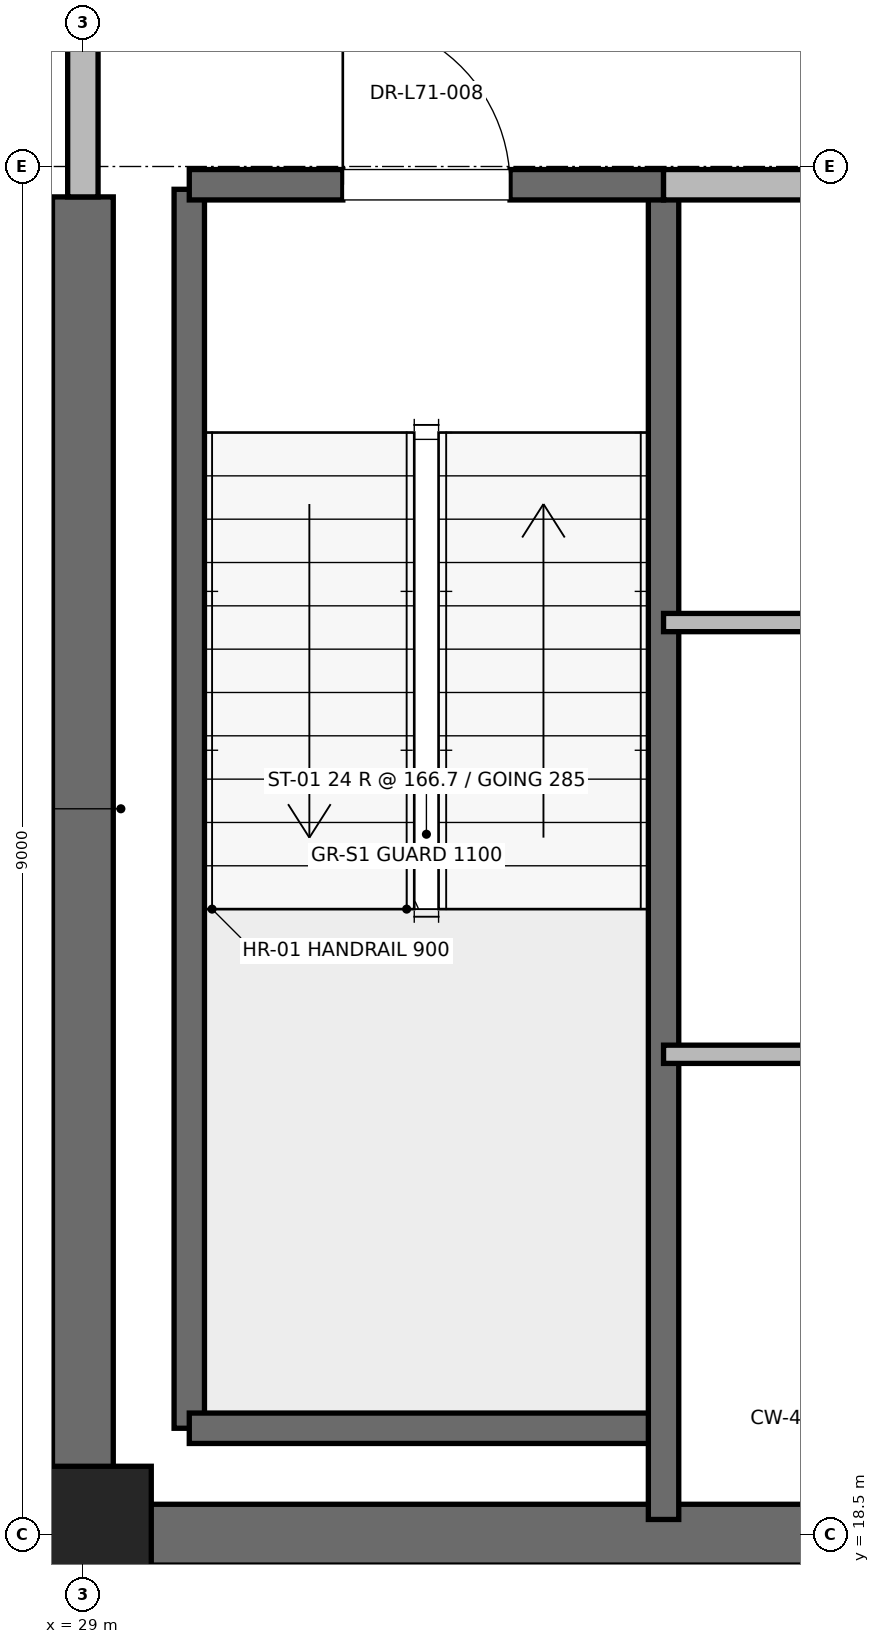
"""IFC4 building model, lengths in metres.
Left out: names, types, materials, properties, quantities, classifications, styles, units other than length and angle.
Written with IfcOpenShell. Run it as: python <this file> out.ifc"""

import sys

from ifc_helpers import new_model, si_unit, direction, frame, frame_2d, origin, origin_2d, place, context, subcontext, project, spatial, rectangle, extrude, element, fill, save


model = new_model("IFC4")
c1 = context("Model", 3, precision=1e-05, world=origin(), true_north=direction((0.0, 1.0)))
c2 = subcontext(c1, "Body", "Model", "MODEL_VIEW")
j1 = project(units=[si_unit("LENGTHUNIT", "METRE"), si_unit("PLANEANGLEUNIT", "RADIAN")], contexts=[c1])
p1 = place(None, origin())
s1 = spatial("IfcSite", under=j1, at=p1, CompositionType="ELEMENT")
p2 = place(p1, origin())
s2 = spatial("IfcBuilding", under=s1, at=p2, CompositionType="ELEMENT")
p3 = place(p2, frame((0.0, 0.0, 306.8)))
s3 = spatial("IfcBuildingStorey", under=s2, at=p3, CompositionType="ELEMENT", Elevation=306.8)
p4 = place(p3, frame((29.0, 18.5, 0.0), z_axis=(0.0, 0.0, 1.0), x_axis=(1.0, 0.0, 0.0)))
e1 = element("IfcColumn", 1, at=p4, inside=s3, PredefinedType="PILASTER", context=c2, shape_type="SweptSolid", body=[
    extrude(rectangle(XDim=0.9, YDim=0.9, at=origin_2d()), origin(), (0.0, 0.0, 1.0), 4.0),
])
p5 = place(p3, frame((29.0, 18.5, 0.0), z_axis=(0.0, 0.0, 1.0), x_axis=(1.0, 0.0, 0.0)))
e2 = element("IfcWall", 2, at=p5, inside=s3, PredefinedType="SHEAR", context=c2, shape_type="SweptSolid", body=[
    extrude(rectangle(XDim=9.2, YDim=0.4, at=frame_2d((4.6, 0.0))), origin(), (0.0, 0.0, 1.0), 3.785),
])
p6 = place(p3, frame((29.0, 18.5, 0.0), z_axis=(0.0, 0.0, 1.0), x_axis=(0.0, 1.0, 0.0)))
e3 = element("IfcWall", 3, at=p6, inside=s3, PredefinedType="SHEAR", context=c2, shape_type="SweptSolid", body=[
    extrude(rectangle(XDim=8.8, YDim=0.4, at=frame_2d((4.4, 0.0))), origin(), (0.0, 0.0, 1.0), 3.785),
])
p7 = place(p3, frame((29.7, 19.2, 0.0), z_axis=(0.0, 0.0, 1.0), x_axis=(0.0, 1.0, 0.0)))
e4 = element("IfcWall", 4, at=p7, inside=s3, PredefinedType="SOLIDWALL", context=c2, shape_type="SweptSolid", body=[
    extrude(rectangle(XDim=8.15, YDim=0.2, at=frame_2d((4.075, 0.0))), origin(), (0.0, 0.0, 1.0), 3.785),
])
p8 = place(p3, frame((29.7, 19.2, 0.0), z_axis=(0.0, 0.0, 1.0), x_axis=(1.0, 0.0, 0.0)))
e5 = element("IfcWall", 5, at=p8, inside=s3, PredefinedType="SOLIDWALL", context=c2, shape_type="SweptSolid", body=[
    extrude(rectangle(XDim=3.12, YDim=0.2, at=frame_2d((1.56, 0.0))), origin(), (0.0, 0.0, 1.0), 3.785),
])
p9 = place(p3, frame((32.82, 18.6, 0.0), z_axis=(0.0, 0.0, 1.0), x_axis=(0.0, 1.0, 0.0)))
e6 = element("IfcWall", 6, at=p9, inside=s3, PredefinedType="SOLIDWALL", context=c2, shape_type="SweptSolid", body=[
    extrude(rectangle(XDim=8.78, YDim=0.2, at=frame_2d((4.39, 0.0))), origin(), (0.0, 0.0, 1.0), 3.785),
])
p10 = place(p3, frame((29.7, 27.38, 0.0), z_axis=(0.0, 0.0, 1.0), x_axis=(1.0, 0.0, 0.0)))
e7 = element("IfcWall", 7, at=p10, inside=s3, PredefinedType="SOLIDWALL", context=c2, shape_type="SweptSolid", body=[
    extrude(rectangle(XDim=3.12, YDim=0.2, at=frame_2d((1.56, 0.0))), origin(), (0.0, 0.0, 1.0), 3.785),
])
p11 = place(p10, frame((1.01, 0.0, 0.0)))
e8 = element("IfcOpeningElement", 8, at=p11, cuts=e7, PredefinedType="OPENING", context=c2, shape_type="SweptSolid", body=[
    extrude(rectangle(XDim=1.1, YDim=2.15, at=frame_2d((0.55, 1.075))), frame((0.0, 0.1, 0.0), z_axis=(0.0, -1.0, 0.0), x_axis=(1.0, 0.0, 0.0)), (0.0, 0.0, 1.0), 0.2),
])
p12 = place(p3, frame((29.0, 27.3, 0.0), z_axis=(0.0, 0.0, 1.0), x_axis=(0.0, 1.0, 0.0)))
e9 = element("IfcWall", 9, at=p12, inside=s3, PredefinedType="PARTITIONING", context=c2, shape_type="SweptSolid", body=[
    extrude(rectangle(XDim=3.4, YDim=0.2, at=frame_2d((1.7, 0.0))), origin(), (0.0, 0.0, 1.0), 2.865),
])
p13 = place(p12, frame((1.125, 0.0, 0.0)))
e10 = element("IfcOpeningElement", 10, at=p13, cuts=e9, PredefinedType="OPENING", context=c2, shape_type="SweptSolid", body=[
    extrude(rectangle(XDim=1.15, YDim=2.2, at=frame_2d((0.575, 1.1))), frame((0.0, 0.1, 0.0), z_axis=(0.0, -1.0, 0.0), x_axis=(1.0, 0.0, 0.0)), (0.0, 0.0, 1.0), 0.2),
])
p14 = place(p3, frame((32.82, 27.38, 0.0), z_axis=(0.0, 0.0, 1.0), x_axis=(1.0, 0.0, 0.0)))
e11 = element("IfcWall", 11, at=p14, inside=s3, PredefinedType="PARTITIONING", context=c2, shape_type="SweptSolid", body=[
    extrude(rectangle(XDim=5.62, YDim=0.2, at=frame_2d((2.81, 0.0))), origin(), (0.0, 0.0, 1.0), 3.785),
])
for number, where, z_axis, x_axis in (
    (12, (32.82, 21.66, 0.0), (0.0, 0.0, 1.0), (1.0, 0.0, 0.0)),
    (13, (32.82, 24.5, 0.0), (0.0, 0.0, 1.0), (1.0, 0.0, 0.0)),
):
    element("IfcWall", number, at=place(p3, frame(where, z_axis=z_axis, x_axis=x_axis)), inside=s3, PredefinedType="PARTITIONING", context=c2, shape_type="SweptSolid", body=[
        extrude(rectangle(XDim=5.23, YDim=0.12, at=frame_2d((2.615, 0.0))), origin(), (0.0, 0.0, 1.0), 2.85),
    ])
p15 = place(p11, origin())
e14 = element("IfcDoor", 14, at=p15, inside=s3, OperationType="SINGLE_SWING_LEFT", PredefinedType="DOOR", context=c2, shape_type="SweptSolid", body=[
    extrude(rectangle(XDim=1.1, YDim=2.15, at=frame_2d((0.55, 1.075))), frame((0.0, 0.025, 0.0), z_axis=(0.0, -1.0, 0.0), x_axis=(1.0, 0.0, 0.0)), (0.0, 0.0, 1.0), 0.05),
])
fill(e8, e14)
save(model, sys.argv[1])
